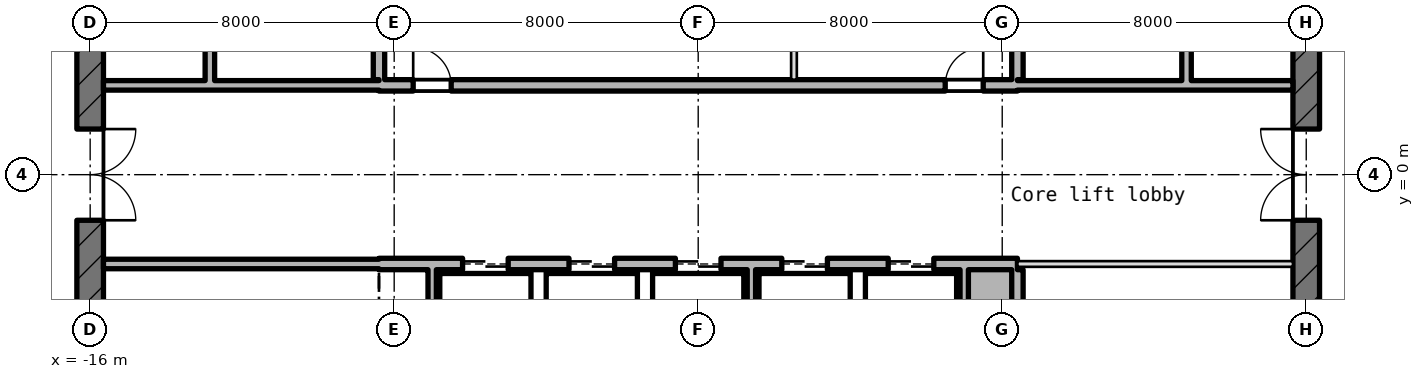
"""IFC4 building model, lengths in metres.
Left out: names, types, materials, properties, quantities, classifications, styles, units other than length and angle.
Written with IfcOpenShell. Run it as: python <this file> out.ifc"""

import sys

from ifc_helpers import new_model, si_unit, direction, frame, frame_2d, origin, place, context, subcontext, project, spatial, rectangle, extrude, element, fill, save


model = new_model("IFC4")
c1 = context("Model", 3, precision=1e-05, world=origin(), true_north=direction((0.0, 1.0)))
c2 = subcontext(c1, "Body", "Model", "MODEL_VIEW")
j1 = project(units=[si_unit("LENGTHUNIT", "METRE"), si_unit("PLANEANGLEUNIT", "RADIAN")], contexts=[c1])
p1 = place(None, origin())
s1 = spatial("IfcSite", under=j1, at=p1, CompositionType="ELEMENT")
p2 = place(p1, origin())
s2 = spatial("IfcBuilding", under=s1, at=p2, CompositionType="ELEMENT")
p3 = place(p2, frame((0.0, 0.0, 296.95)))
s3 = spatial("IfcBuildingStorey", under=s2, at=p3, CompositionType="ELEMENT", Elevation=296.95)
p4 = place(p3, frame((16.0, -10.145, -0.18), z_axis=(0.0, 0.0, 1.0), x_axis=(0.0, 1.0, 0.0)))
e1 = element("IfcWall", 1, at=p4, inside=s3, PredefinedType="SHEAR", context=c2, shape_type="SweptSolid", body=[
    extrude(rectangle(XDim=20.29, YDim=0.7, at=frame_2d((10.145, 0.0))), origin(), (0.0, 0.0, 1.0), 4.15),
])
p5 = place(p4, frame((8.945, 0.0, 0.18)))
e2 = element("IfcOpeningElement", 2, at=p5, cuts=e1, PredefinedType="OPENING", context=c2, shape_type="SweptSolid", body=[
    extrude(rectangle(XDim=2.4, YDim=2.1, at=frame_2d((1.2, 1.05))), frame((0.0, 0.36, 0.0), z_axis=(0.0, -1.0, 0.0), x_axis=(1.0, 0.0, 0.0)), (0.0, 0.0, 1.0), 0.72),
])
p6 = place(p4, frame((13.545, 0.0, 0.18)))
e3 = element("IfcOpeningElement", 3, at=p6, cuts=e1, PredefinedType="OPENING", context=c2, shape_type="SweptSolid", body=[
    extrude(rectangle(XDim=1.2, YDim=2.1, at=frame_2d((0.6, 1.05))), frame((0.0, 0.36, 0.0), z_axis=(0.0, -1.0, 0.0), x_axis=(1.0, 0.0, 0.0)), (0.0, 0.0, 1.0), 0.72),
])
p7 = place(p4, frame((2.4, 0.0, 0.18)))
e4 = element("IfcOpeningElement", 4, at=p7, cuts=e1, PredefinedType="OPENING", context=c2, shape_type="SweptSolid", body=[
    extrude(rectangle(XDim=1.2, YDim=2.1, at=frame_2d((0.6, 1.05))), frame((0.0, 0.36, 0.0), z_axis=(0.0, -1.0, 0.0), x_axis=(1.0, 0.0, 0.0)), (0.0, 0.0, 1.0), 0.72),
])
p8 = place(p3, frame((-16.0, 10.145, -0.18), z_axis=(0.0, 0.0, 1.0), x_axis=(0.0, -1.0, 0.0)))
e5 = element("IfcWall", 5, at=p8, inside=s3, PredefinedType="SHEAR", context=c2, shape_type="SweptSolid", body=[
    extrude(rectangle(XDim=20.29, YDim=0.7, at=frame_2d((10.145, 0.0))), origin(), (0.0, 0.0, 1.0), 4.15),
])
p9 = place(p8, frame((8.945, 0.0, 0.18)))
e6 = element("IfcOpeningElement", 6, at=p9, cuts=e5, PredefinedType="OPENING", context=c2, shape_type="SweptSolid", body=[
    extrude(rectangle(XDim=2.4, YDim=2.1, at=frame_2d((1.2, 1.05))), frame((0.0, 0.36, 0.0), z_axis=(0.0, -1.0, 0.0), x_axis=(1.0, 0.0, 0.0)), (0.0, 0.0, 1.0), 0.72),
])
p10 = place(p8, frame((5.545, 0.0, 0.18)))
e7 = element("IfcOpeningElement", 7, at=p10, cuts=e5, PredefinedType="OPENING", context=c2, shape_type="SweptSolid", body=[
    extrude(rectangle(XDim=1.2, YDim=2.1, at=frame_2d((0.6, 1.05))), frame((0.0, 0.36, 0.0), z_axis=(0.0, -1.0, 0.0), x_axis=(1.0, 0.0, 0.0)), (0.0, 0.0, 1.0), 0.72),
])
p11 = place(p3, frame((-15.65, -2.35, 0.0), z_axis=(0.0, 0.0, 1.0), x_axis=(1.0, 0.0, 0.0)))
e8 = element("IfcWall", 8, at=p11, inside=s3, PredefinedType="STANDARD", context=c2, shape_type="SweptSolid", body=[
    extrude(rectangle(XDim=7.25, YDim=0.25, at=frame_2d((3.625, 0.0))), origin(), (0.0, 0.0, 1.0), 3.97),
])
p12 = place(p3, frame((-8.4, -2.35, -0.18), z_axis=(0.0, 0.0, 1.0), x_axis=(1.0, 0.0, 0.0)))
e9 = element("IfcWall", 9, at=p12, inside=s3, PredefinedType="SHEAR", context=c2, shape_type="SweptSolid", body=[
    extrude(rectangle(XDim=16.8, YDim=0.3, at=frame_2d((8.4, 0.0))), origin(), (0.0, 0.0, 1.0), 4.15),
])
p13 = place(p12, frame((2.2, 0.0, 0.18)))
e10 = element("IfcOpeningElement", 10, at=p13, cuts=e9, PredefinedType="OPENING", context=c2, shape_type="SweptSolid", body=[
    extrude(rectangle(XDim=1.2, YDim=2.1, at=frame_2d((0.6, 1.05))), frame((0.0, 0.16, 0.0), z_axis=(0.0, -1.0, 0.0), x_axis=(1.0, 0.0, 0.0)), (0.0, 0.0, 1.0), 0.32),
])
p14 = place(p12, frame((5.0, 0.0, 0.18)))
e11 = element("IfcOpeningElement", 11, at=p14, cuts=e9, PredefinedType="OPENING", context=c2, shape_type="SweptSolid", body=[
    extrude(rectangle(XDim=1.2, YDim=2.1, at=frame_2d((0.6, 1.05))), frame((0.0, 0.16, 0.0), z_axis=(0.0, -1.0, 0.0), x_axis=(1.0, 0.0, 0.0)), (0.0, 0.0, 1.0), 0.32),
])
p15 = place(p12, frame((7.8, 0.0, 0.18)))
e12 = element("IfcOpeningElement", 12, at=p15, cuts=e9, PredefinedType="OPENING", context=c2, shape_type="SweptSolid", body=[
    extrude(rectangle(XDim=1.2, YDim=2.1, at=frame_2d((0.6, 1.05))), frame((0.0, 0.16, 0.0), z_axis=(0.0, -1.0, 0.0), x_axis=(1.0, 0.0, 0.0)), (0.0, 0.0, 1.0), 0.32),
])
p16 = place(p12, frame((10.6, 0.0, 0.18)))
e13 = element("IfcOpeningElement", 13, at=p16, cuts=e9, PredefinedType="OPENING", context=c2, shape_type="SweptSolid", body=[
    extrude(rectangle(XDim=1.2, YDim=2.1, at=frame_2d((0.6, 1.05))), frame((0.0, 0.16, 0.0), z_axis=(0.0, -1.0, 0.0), x_axis=(1.0, 0.0, 0.0)), (0.0, 0.0, 1.0), 0.32),
])
p17 = place(p12, frame((13.4, 0.0, 0.18)))
e14 = element("IfcOpeningElement", 14, at=p17, cuts=e9, PredefinedType="OPENING", context=c2, shape_type="SweptSolid", body=[
    extrude(rectangle(XDim=1.2, YDim=2.1, at=frame_2d((0.6, 1.05))), frame((0.0, 0.16, 0.0), z_axis=(0.0, -1.0, 0.0), x_axis=(1.0, 0.0, 0.0)), (0.0, 0.0, 1.0), 0.32),
])
p18 = place(p3, frame((8.4, -2.35, 0.0), z_axis=(0.0, 0.0, 1.0), x_axis=(1.0, 0.0, 0.0)))
e15 = element("IfcWall", 15, at=p18, inside=s3, PredefinedType="PARTITIONING", context=c2, shape_type="SweptSolid", body=[
    extrude(rectangle(XDim=7.25, YDim=0.15, at=frame_2d((3.625, 0.0))), origin(), (0.0, 0.0, 1.0), 3.97),
])
p19 = place(p3, frame((-15.65, 2.35, 0.0), z_axis=(0.0, 0.0, 1.0), x_axis=(1.0, 0.0, 0.0)))
e16 = element("IfcWall", 16, at=p19, inside=s3, PredefinedType="STANDARD", context=c2, shape_type="SweptSolid", body=[
    extrude(rectangle(XDim=7.25, YDim=0.25, at=frame_2d((3.625, 0.0))), origin(), (0.0, 0.0, 1.0), 3.97),
])
p20 = place(p3, frame((-8.4, 2.35, -0.18), z_axis=(0.0, 0.0, 1.0), x_axis=(1.0, 0.0, 0.0)))
e17 = element("IfcWall", 17, at=p20, inside=s3, PredefinedType="SHEAR", context=c2, shape_type="SweptSolid", body=[
    extrude(rectangle(XDim=16.8, YDim=0.3, at=frame_2d((8.4, 0.0))), origin(), (0.0, 0.0, 1.0), 4.15),
])
p21 = place(p20, frame((0.9, 0.0, 0.18)))
e18 = element("IfcOpeningElement", 18, at=p21, cuts=e17, PredefinedType="OPENING", context=c2, shape_type="SweptSolid", body=[
    extrude(rectangle(XDim=1.0, YDim=2.1, at=frame_2d((0.5, 1.05))), frame((0.0, 0.16, 0.0), z_axis=(0.0, -1.0, 0.0), x_axis=(1.0, 0.0, 0.0)), (0.0, 0.0, 1.0), 0.32),
])
p22 = place(p20, frame((14.9, 0.0, 0.18)))
e19 = element("IfcOpeningElement", 19, at=p22, cuts=e17, PredefinedType="OPENING", context=c2, shape_type="SweptSolid", body=[
    extrude(rectangle(XDim=1.0, YDim=2.1, at=frame_2d((0.5, 1.05))), frame((0.0, 0.16, 0.0), z_axis=(0.0, -1.0, 0.0), x_axis=(1.0, 0.0, 0.0)), (0.0, 0.0, 1.0), 0.32),
])
p23 = place(p3, frame((8.4, 2.35, 0.0), z_axis=(0.0, 0.0, 1.0), x_axis=(1.0, 0.0, 0.0)))
e20 = element("IfcWall", 20, at=p23, inside=s3, PredefinedType="STANDARD", context=c2, shape_type="SweptSolid", body=[
    extrude(rectangle(XDim=7.25, YDim=0.25, at=frame_2d((3.625, 0.0))), origin(), (0.0, 0.0, 1.0), 3.97),
])
p24 = place(p3, frame((-12.85, 2.475, 0.0), z_axis=(0.0, 0.0, 1.0), x_axis=(0.0, 1.0, 0.0)))
e21 = element("IfcWall", 21, at=p24, inside=s3, PredefinedType="STANDARD", context=c2, shape_type="SweptSolid", body=[
    extrude(rectangle(XDim=3.05, YDim=0.25, at=frame_2d((1.525, 0.0))), origin(), (0.0, 0.0, 1.0), 3.97),
])
p25 = place(p3, frame((-8.4, 2.5, -0.18), z_axis=(0.0, 0.0, 1.0), x_axis=(0.0, 1.0, 0.0)))
e22 = element("IfcWall", 22, at=p25, inside=s3, PredefinedType="SHEAR", context=c2, shape_type="SweptSolid", body=[
    extrude(rectangle(XDim=5.85, YDim=0.3, at=frame_2d((2.925, 0.0))), origin(), (0.0, 0.0, 1.0), 4.15),
])
for number, where, z_axis, x_axis in (
    (23, (-7.0, -5.24, 0.0), (0.0, 0.0, 1.0), (0.0, 1.0, 0.0)),
    (24, (1.4, -5.24, 0.0), (0.0, 0.0, 1.0), (0.0, 1.0, 0.0)),
):
    element("IfcWall", number, at=place(p3, frame(where, z_axis=z_axis, x_axis=x_axis)), inside=s3, PredefinedType="STANDARD", context=c2, shape_type="SweptSolid", body=[
        extrude(rectangle(XDim=2.74, YDim=0.22, at=frame_2d((1.37, 0.0))), origin(), (0.0, 0.0, 1.0), 3.97),
    ])
p26 = place(p3, frame((2.52, 2.5, 0.0), z_axis=(0.0, 0.0, 1.0), x_axis=(0.0, 1.0, 0.0)))
e25 = element("IfcWall", 25, at=p26, inside=s3, PredefinedType="PARTITIONING", context=c2, shape_type="SweptSolid", body=[
    extrude(rectangle(XDim=2.775, YDim=0.15, at=frame_2d((1.387, 0.0))), origin(), (0.0, 0.0, 1.0), 3.97),
])
p27 = place(p3, frame((7.0, -5.24, 0.0), z_axis=(0.0, 0.0, 1.0), x_axis=(0.0, 1.0, 0.0)))
e26 = element("IfcWall", 26, at=p27, inside=s3, PredefinedType="STANDARD", context=c2, shape_type="SweptSolid", body=[
    extrude(rectangle(XDim=2.74, YDim=0.22, at=frame_2d((1.37, 0.0))), origin(), (0.0, 0.0, 1.0), 3.97),
])
for number, where, z_axis, x_axis in (
    (27, (8.4, -8.35, -0.18), (0.0, 0.0, 1.0), (0.0, 1.0, 0.0)),
    (28, (8.4, 2.5, -0.18), (0.0, 0.0, 1.0), (0.0, 1.0, 0.0)),
):
    element("IfcWall", number, at=place(p3, frame(where, z_axis=z_axis, x_axis=x_axis)), inside=s3, PredefinedType="SHEAR", context=c2, shape_type="SweptSolid", body=[
        extrude(rectangle(XDim=5.85, YDim=0.3, at=frame_2d((2.925, 0.0))), origin(), (0.0, 0.0, 1.0), 4.15),
    ])
p28 = place(p3, frame((12.85, 2.475, 0.0), z_axis=(0.0, 0.0, 1.0), x_axis=(0.0, 1.0, 0.0)))
e29 = element("IfcWall", 29, at=p28, inside=s3, PredefinedType="STANDARD", context=c2, shape_type="SweptSolid", body=[
    extrude(rectangle(XDim=3.05, YDim=0.25, at=frame_2d((1.525, 0.0))), origin(), (0.0, 0.0, 1.0), 3.97),
])
p29 = place(p13, origin())
e30 = element("IfcDoor", 30, at=p29, inside=s3, OperationType="DOUBLE_DOOR_SLIDING", PredefinedType="DOOR", context=c2, shape_type="SweptSolid", body=[
    extrude(rectangle(XDim=1.2, YDim=2.1, at=frame_2d((0.6, 1.05))), frame((0.0, 0.025, 0.0), z_axis=(0.0, -1.0, 0.0), x_axis=(1.0, 0.0, 0.0)), (0.0, 0.0, 1.0), 0.05),
])
fill(e10, e30)
p30 = place(p14, origin())
e31 = element("IfcDoor", 31, at=p30, inside=s3, OperationType="DOUBLE_DOOR_SLIDING", PredefinedType="DOOR", context=c2, shape_type="SweptSolid", body=[
    extrude(rectangle(XDim=1.2, YDim=2.1, at=frame_2d((0.6, 1.05))), frame((0.0, 0.025, 0.0), z_axis=(0.0, -1.0, 0.0), x_axis=(1.0, 0.0, 0.0)), (0.0, 0.0, 1.0), 0.05),
])
fill(e11, e31)
p31 = place(p15, origin())
e32 = element("IfcDoor", 32, at=p31, inside=s3, OperationType="DOUBLE_DOOR_SLIDING", PredefinedType="DOOR", context=c2, shape_type="SweptSolid", body=[
    extrude(rectangle(XDim=1.2, YDim=2.1, at=frame_2d((0.6, 1.05))), frame((0.0, 0.025, 0.0), z_axis=(0.0, -1.0, 0.0), x_axis=(1.0, 0.0, 0.0)), (0.0, 0.0, 1.0), 0.05),
])
fill(e12, e32)
p32 = place(p16, origin())
e33 = element("IfcDoor", 33, at=p32, inside=s3, OperationType="DOUBLE_DOOR_SLIDING", PredefinedType="DOOR", context=c2, shape_type="SweptSolid", body=[
    extrude(rectangle(XDim=1.2, YDim=2.1, at=frame_2d((0.6, 1.05))), frame((0.0, 0.025, 0.0), z_axis=(0.0, -1.0, 0.0), x_axis=(1.0, 0.0, 0.0)), (0.0, 0.0, 1.0), 0.05),
])
fill(e13, e33)
p33 = place(p17, origin())
e34 = element("IfcDoor", 34, at=p33, inside=s3, OperationType="DOUBLE_DOOR_SLIDING", PredefinedType="DOOR", context=c2, shape_type="SweptSolid", body=[
    extrude(rectangle(XDim=1.2, YDim=2.1, at=frame_2d((0.6, 1.05))), frame((0.0, 0.025, 0.0), z_axis=(0.0, -1.0, 0.0), x_axis=(1.0, 0.0, 0.0)), (0.0, 0.0, 1.0), 0.05),
])
fill(e14, e34)
p34 = place(p9, origin())
e35 = element("IfcDoor", 35, at=p34, inside=s3, OperationType="DOUBLE_DOOR_SINGLE_SWING", PredefinedType="DOOR", context=c2, shape_type="SweptSolid", body=[
    extrude(rectangle(XDim=2.4, YDim=2.1, at=frame_2d((1.2, 1.05))), frame((0.0, 0.025, 0.0), z_axis=(0.0, -1.0, 0.0), x_axis=(1.0, 0.0, 0.0)), (0.0, 0.0, 1.0), 0.05),
])
fill(e6, e35)
p35 = place(p5, origin())
e36 = element("IfcDoor", 36, at=p35, inside=s3, OperationType="DOUBLE_DOOR_SINGLE_SWING", PredefinedType="DOOR", context=c2, shape_type="SweptSolid", body=[
    extrude(rectangle(XDim=2.4, YDim=2.1, at=frame_2d((1.2, 1.05))), frame((0.0, 0.025, 0.0), z_axis=(0.0, -1.0, 0.0), x_axis=(1.0, 0.0, 0.0)), (0.0, 0.0, 1.0), 0.05),
])
fill(e2, e36)
p36 = place(p21, origin())
e37 = element("IfcDoor", 37, at=p36, inside=s3, OperationType="SINGLE_SWING_RIGHT", PredefinedType="DOOR", context=c2, shape_type="SweptSolid", body=[
    extrude(rectangle(XDim=1.0, YDim=2.1, at=frame_2d((0.5, 1.05))), frame((0.0, 0.025, 0.0), z_axis=(0.0, -1.0, 0.0), x_axis=(1.0, 0.0, 0.0)), (0.0, 0.0, 1.0), 0.05),
])
fill(e18, e37)
p37 = place(p22, origin())
e38 = element("IfcDoor", 38, at=p37, inside=s3, OperationType="SINGLE_SWING_RIGHT", PredefinedType="DOOR", context=c2, shape_type="SweptSolid", body=[
    extrude(rectangle(XDim=1.0, YDim=2.1, at=frame_2d((0.5, 1.05))), frame((0.0, 0.025, 0.0), z_axis=(0.0, -1.0, 0.0), x_axis=(1.0, 0.0, 0.0)), (0.0, 0.0, 1.0), 0.05),
])
fill(e19, e38)
save(model, sys.argv[1])
